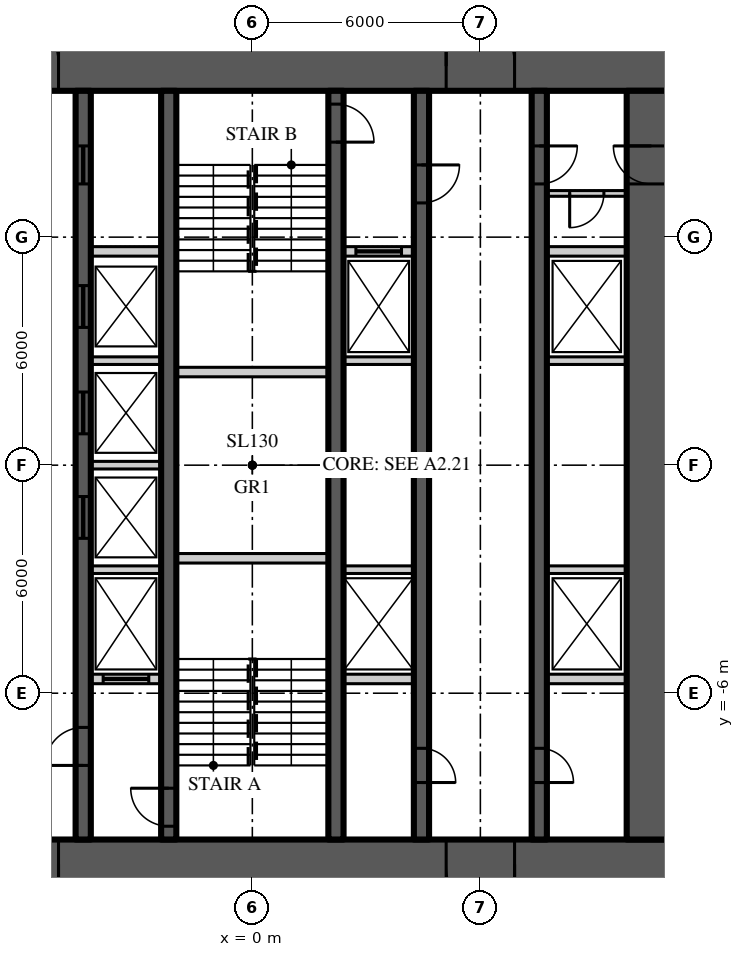
"""IFC4 building model, lengths in metres.
Left out: names, types, materials, properties, quantities, classifications, styles, units other than length and angle.
Written with IfcOpenShell. Run it as: python <this file> out.ifc"""

import sys

from ifc_helpers import new_model, si_unit, direction, frame, frame_2d, origin, place, context, subcontext, project, spatial, rectangle, extrude, element, fill, save


model = new_model("IFC4")
c1 = context("Model", 3, precision=1e-05, world=origin(), true_north=direction((0.0, 1.0)))
c2 = subcontext(c1, "Body", "Model", "MODEL_VIEW")
j1 = project(units=[si_unit("LENGTHUNIT", "METRE"), si_unit("PLANEANGLEUNIT", "RADIAN")], contexts=[c1])
p1 = place(None, origin())
s1 = spatial("IfcSite", under=j1, at=p1, CompositionType="ELEMENT")
p2 = place(p1, origin())
s2 = spatial("IfcBuilding", under=s1, at=p2, CompositionType="ELEMENT")
p3 = place(p2, frame((0.0, 0.0, 155.4)))
s3 = spatial("IfcBuildingStorey", under=s2, at=p3, CompositionType="ELEMENT", Elevation=155.4)
p4 = place(p3, frame((-11.15, 10.5, 0.0), z_axis=(0.0, 0.0, 1.0), x_axis=(1.0, 0.0, 0.0)))
e1 = element("IfcWall", 1, at=p4, inside=s3, PredefinedType="SHEAR", context=c2, shape_type="SweptSolid", body=[
    extrude(rectangle(XDim=22.3, YDim=1.3, at=frame_2d((11.15, 0.0))), origin(), (0.0, 0.0, 1.0), 3.9),
])
p5 = place(p4, frame((4.25, 0.0, 0.0)))
e2 = element("IfcOpeningElement", 2, at=p5, cuts=e1, PredefinedType="OPENING", context=c2, shape_type="SweptSolid", body=[
    extrude(rectangle(XDim=1.8, YDim=2.2, at=frame_2d((0.9, 1.1))), frame((0.0, 0.66, 0.0), z_axis=(0.0, -1.0, 0.0), x_axis=(1.0, 0.0, 0.0)), (0.0, 0.0, 1.0), 1.32),
])
p6 = place(p4, frame((16.25, 0.0, 0.0)))
e3 = element("IfcOpeningElement", 3, at=p6, cuts=e1, PredefinedType="OPENING", context=c2, shape_type="SweptSolid", body=[
    extrude(rectangle(XDim=1.8, YDim=2.2, at=frame_2d((0.9, 1.1))), frame((0.0, 0.66, 0.0), z_axis=(0.0, -1.0, 0.0), x_axis=(1.0, 0.0, 0.0)), (0.0, 0.0, 1.0), 1.32),
])
p7 = place(p3, frame((11.15, -10.5, 0.0), z_axis=(0.0, 0.0, 1.0), x_axis=(-1.0, 0.0, 0.0)))
e4 = element("IfcWall", 4, at=p7, inside=s3, PredefinedType="SHEAR", context=c2, shape_type="SweptSolid", body=[
    extrude(rectangle(XDim=22.3, YDim=1.3, at=frame_2d((11.15, 0.0))), origin(), (0.0, 0.0, 1.0), 3.9),
])
p8 = place(p7, frame((16.25, 0.0, 0.0)))
e5 = element("IfcOpeningElement", 5, at=p8, cuts=e4, PredefinedType="OPENING", context=c2, shape_type="SweptSolid", body=[
    extrude(rectangle(XDim=1.8, YDim=2.2, at=frame_2d((0.9, 1.1))), frame((0.0, 0.66, 0.0), z_axis=(0.0, -1.0, 0.0), x_axis=(1.0, 0.0, 0.0)), (0.0, 0.0, 1.0), 1.32),
])
p9 = place(p7, frame((4.25, 0.0, 0.0)))
e6 = element("IfcOpeningElement", 6, at=p9, cuts=e4, PredefinedType="OPENING", context=c2, shape_type="SweptSolid", body=[
    extrude(rectangle(XDim=1.8, YDim=2.2, at=frame_2d((0.9, 1.1))), frame((0.0, 0.66, 0.0), z_axis=(0.0, -1.0, 0.0), x_axis=(1.0, 0.0, 0.0)), (0.0, 0.0, 1.0), 1.32),
])
p10 = place(p3, frame((10.5, -9.85, 0.0), z_axis=(0.0, 0.0, 1.0), x_axis=(0.0, 1.0, 0.0)))
e7 = element("IfcWall", 7, at=p10, inside=s3, PredefinedType="SHEAR", context=c2, shape_type="SweptSolid", body=[
    extrude(rectangle(XDim=19.7, YDim=1.3, at=frame_2d((9.85, 0.0))), origin(), (0.0, 0.0, 1.0), 3.9),
])
p11 = place(p10, frame((17.25, 0.0, 0.0)))
e8 = element("IfcOpeningElement", 8, at=p11, cuts=e7, PredefinedType="OPENING", context=c2, shape_type="SweptSolid", body=[
    extrude(rectangle(XDim=1.0, YDim=2.2, at=frame_2d((0.5, 1.1))), frame((0.0, 0.66, 0.0), z_axis=(0.0, -1.0, 0.0), x_axis=(1.0, 0.0, 0.0)), (0.0, 0.0, 1.0), 1.32),
])
p12 = place(p3, frame((7.55, 9.85, 0.0), z_axis=(0.0, 0.0, 1.0), x_axis=(0.0, -1.0, 0.0)))
e9 = element("IfcWall", 9, at=p12, inside=s3, PredefinedType="SHEAR", context=c2, shape_type="SweptSolid", body=[
    extrude(rectangle(XDim=19.7, YDim=0.4, at=frame_2d((9.85, 0.0))), origin(), (0.0, 0.0, 1.0), 3.9),
])
p13 = place(p12, frame((1.45, 0.0, 0.0)))
e10 = element("IfcOpeningElement", 10, at=p13, cuts=e9, PredefinedType="OPENING", context=c2, shape_type="SweptSolid", body=[
    extrude(rectangle(XDim=1.0, YDim=2.2, at=frame_2d((0.5, 1.1))), frame((0.0, 0.21, 0.0), z_axis=(0.0, -1.0, 0.0), x_axis=(1.0, 0.0, 0.0)), (0.0, 0.0, 1.0), 0.42),
])
p14 = place(p12, frame((17.3, 0.0, 0.0)))
e11 = element("IfcOpeningElement", 11, at=p14, cuts=e9, PredefinedType="OPENING", context=c2, shape_type="SweptSolid", body=[
    extrude(rectangle(XDim=0.9, YDim=2.1, at=frame_2d((0.45, 1.05))), frame((0.0, 0.21, 0.0), z_axis=(0.0, -1.0, 0.0), x_axis=(1.0, 0.0, 0.0)), (0.0, 0.0, 1.0), 0.42),
])
p15 = place(p3, frame((-4.45, -9.85, 0.0), z_axis=(0.0, 0.0, 1.0), x_axis=(0.0, 1.0, 0.0)))
e12 = element("IfcWall", 12, at=p15, inside=s3, PredefinedType="SHEAR", context=c2, shape_type="SweptSolid", body=[
    extrude(rectangle(XDim=19.7, YDim=0.4, at=frame_2d((9.85, 0.0))), origin(), (0.0, 0.0, 1.0), 3.9),
])
p16 = place(p15, frame((1.95, 0.0, 0.0)))
e13 = element("IfcOpeningElement", 13, at=p16, cuts=e12, PredefinedType="OPENING", context=c2, shape_type="SweptSolid", body=[
    extrude(rectangle(XDim=1.0, YDim=2.2, at=frame_2d((0.5, 1.1))), frame((0.0, 0.21, 0.0), z_axis=(0.0, -1.0, 0.0), x_axis=(1.0, 0.0, 0.0)), (0.0, 0.0, 1.0), 0.42),
])
p17 = place(p15, frame((17.25, 0.0, 0.0)))
e14 = element("IfcOpeningElement", 14, at=p17, cuts=e12, PredefinedType="OPENING", context=c2, shape_type="SweptSolid", body=[
    extrude(rectangle(XDim=1.0, YDim=2.1, at=frame_2d((0.5, 1.05))), frame((0.0, 0.21, 0.0), z_axis=(0.0, -1.0, 0.0), x_axis=(1.0, 0.0, 0.0)), (0.0, 0.0, 1.0), 0.42),
])
p18 = place(p15, frame((7.925, 0.0, 0.0)))
e15 = element("IfcOpeningElement", 15, at=p18, cuts=e12, PredefinedType="OPENING", context=c2, shape_type="SweptSolid", body=[
    extrude(rectangle(XDim=1.1, YDim=2.2, at=frame_2d((0.55, 1.1))), frame((0.0, 0.21, 0.0), z_axis=(0.0, -1.0, 0.0), x_axis=(1.0, 0.0, 0.0)), (0.0, 0.0, 1.0), 0.42),
])
p19 = place(p15, frame((10.675, 0.0, 0.0)))
e16 = element("IfcOpeningElement", 16, at=p19, cuts=e12, PredefinedType="OPENING", context=c2, shape_type="SweptSolid", body=[
    extrude(rectangle(XDim=1.1, YDim=2.2, at=frame_2d((0.55, 1.1))), frame((0.0, 0.21, 0.0), z_axis=(0.0, -1.0, 0.0), x_axis=(1.0, 0.0, 0.0)), (0.0, 0.0, 1.0), 0.42),
])
p20 = place(p15, frame((13.475, 0.0, 0.0)))
e17 = element("IfcOpeningElement", 17, at=p20, cuts=e12, PredefinedType="OPENING", context=c2, shape_type="SweptSolid", body=[
    extrude(rectangle(XDim=1.1, YDim=2.2, at=frame_2d((0.55, 1.1))), frame((0.0, 0.21, 0.0), z_axis=(0.0, -1.0, 0.0), x_axis=(1.0, 0.0, 0.0)), (0.0, 0.0, 1.0), 0.42),
])
p21 = place(p3, frame((4.45, 9.85, 0.0), z_axis=(0.0, 0.0, 1.0), x_axis=(0.0, -1.0, 0.0)))
e18 = element("IfcWall", 18, at=p21, inside=s3, PredefinedType="SHEAR", context=c2, shape_type="SweptSolid", body=[
    extrude(rectangle(XDim=19.7, YDim=0.4, at=frame_2d((9.85, 0.0))), origin(), (0.0, 0.0, 1.0), 3.9),
])
p22 = place(p21, frame((1.95, 0.0, 0.0)))
e19 = element("IfcOpeningElement", 19, at=p22, cuts=e18, PredefinedType="OPENING", context=c2, shape_type="SweptSolid", body=[
    extrude(rectangle(XDim=1.0, YDim=2.2, at=frame_2d((0.5, 1.1))), frame((0.0, 0.21, 0.0), z_axis=(0.0, -1.0, 0.0), x_axis=(1.0, 0.0, 0.0)), (0.0, 0.0, 1.0), 0.42),
])
p23 = place(p21, frame((17.3, 0.0, 0.0)))
e20 = element("IfcOpeningElement", 20, at=p23, cuts=e18, PredefinedType="OPENING", context=c2, shape_type="SweptSolid", body=[
    extrude(rectangle(XDim=0.9, YDim=2.1, at=frame_2d((0.45, 1.05))), frame((0.0, 0.21, 0.0), z_axis=(0.0, -1.0, 0.0), x_axis=(1.0, 0.0, 0.0)), (0.0, 0.0, 1.0), 0.42),
])
p24 = place(p3, frame((-2.2, -9.85, 0.0), z_axis=(0.0, 0.0, 1.0), x_axis=(0.0, 1.0, 0.0)))
e21 = element("IfcWall", 21, at=p24, inside=s3, PredefinedType="SHEAR", context=c2, shape_type="SweptSolid", body=[
    extrude(rectangle(XDim=19.7, YDim=0.4, at=frame_2d((9.85, 0.0))), origin(), (0.0, 0.0, 1.0), 3.9),
])
p25 = place(p24, frame((0.35, 0.0, 0.0)))
e22 = element("IfcOpeningElement", 22, at=p25, cuts=e21, PredefinedType="OPENING", context=c2, shape_type="SweptSolid", body=[
    extrude(rectangle(XDim=1.0, YDim=2.2, at=frame_2d((0.5, 1.1))), frame((0.0, 0.21, 0.0), z_axis=(0.0, -1.0, 0.0), x_axis=(1.0, 0.0, 0.0)), (0.0, 0.0, 1.0), 0.42),
])
p26 = place(p3, frame((2.2, 9.85, 0.0), z_axis=(0.0, 0.0, 1.0), x_axis=(0.0, -1.0, 0.0)))
e23 = element("IfcWall", 23, at=p26, inside=s3, PredefinedType="SHEAR", context=c2, shape_type="SweptSolid", body=[
    extrude(rectangle(XDim=19.7, YDim=0.4, at=frame_2d((9.85, 0.0))), origin(), (0.0, 0.0, 1.0), 3.9),
])
p27 = place(p26, frame((0.35, 0.0, 0.0)))
e24 = element("IfcOpeningElement", 24, at=p27, cuts=e23, PredefinedType="OPENING", context=c2, shape_type="SweptSolid", body=[
    extrude(rectangle(XDim=1.0, YDim=2.2, at=frame_2d((0.5, 1.1))), frame((0.0, 0.21, 0.0), z_axis=(0.0, -1.0, 0.0), x_axis=(1.0, 0.0, 0.0)), (0.0, 0.0, 1.0), 0.42),
])
p28 = place(p3, frame((-4.25, 5.625, 0.0), z_axis=(0.0, 0.0, 1.0), x_axis=(1.0, 0.0, 0.0)))
e25 = element("IfcWall", 25, at=p28, inside=s3, PredefinedType="SOLIDWALL", context=c2, shape_type="SweptSolid", body=[
    extrude(rectangle(XDim=1.85, YDim=0.25, at=frame_2d((0.925, 0.0))), origin(), (0.0, 0.0, 1.0), 3.7),
])
p29 = place(p3, frame((2.4, 5.625, 0.0), z_axis=(0.0, 0.0, 1.0), x_axis=(1.0, 0.0, 0.0)))
e26 = element("IfcWall", 26, at=p29, inside=s3, PredefinedType="SOLIDWALL", context=c2, shape_type="SweptSolid", body=[
    extrude(rectangle(XDim=1.85, YDim=0.25, at=frame_2d((0.925, 0.0))), origin(), (0.0, 0.0, 1.0), 3.7),
])
p30 = place(p29, frame((0.325, 0.0, 0.0)))
e27 = element("IfcOpeningElement", 27, at=p30, cuts=e26, PredefinedType="OPENING", context=c2, shape_type="SweptSolid", body=[
    extrude(rectangle(XDim=1.2, YDim=2.2, at=frame_2d((0.6, 1.1))), frame((0.0, 0.135, 0.0), z_axis=(0.0, -1.0, 0.0), x_axis=(1.0, 0.0, 0.0)), (0.0, 0.0, 1.0), 0.27),
])
p31 = place(p3, frame((7.75, 5.625, 0.0), z_axis=(0.0, 0.0, 1.0), x_axis=(1.0, 0.0, 0.0)))
e28 = element("IfcWall", 28, at=p31, inside=s3, PredefinedType="SOLIDWALL", context=c2, shape_type="SweptSolid", body=[
    extrude(rectangle(XDim=2.1, YDim=0.25, at=frame_2d((1.05, 0.0))), origin(), (0.0, 0.0, 1.0), 3.7),
])
p32 = place(p3, frame((-4.25, -5.625, 0.0), z_axis=(0.0, 0.0, 1.0), x_axis=(1.0, 0.0, 0.0)))
e29 = element("IfcWall", 29, at=p32, inside=s3, PredefinedType="SOLIDWALL", context=c2, shape_type="SweptSolid", body=[
    extrude(rectangle(XDim=1.85, YDim=0.25, at=frame_2d((0.925, 0.0))), origin(), (0.0, 0.0, 1.0), 3.7),
])
p33 = place(p32, frame((0.325, 0.0, 0.0)))
e30 = element("IfcOpeningElement", 30, at=p33, cuts=e29, PredefinedType="OPENING", context=c2, shape_type="SweptSolid", body=[
    extrude(rectangle(XDim=1.2, YDim=2.2, at=frame_2d((0.6, 1.1))), frame((0.0, 0.135, 0.0), z_axis=(0.0, -1.0, 0.0), x_axis=(1.0, 0.0, 0.0)), (0.0, 0.0, 1.0), 0.27),
])
p34 = place(p3, frame((2.4, -5.625, 0.0), z_axis=(0.0, 0.0, 1.0), x_axis=(1.0, 0.0, 0.0)))
e31 = element("IfcWall", 31, at=p34, inside=s3, PredefinedType="SOLIDWALL", context=c2, shape_type="SweptSolid", body=[
    extrude(rectangle(XDim=1.85, YDim=0.25, at=frame_2d((0.925, 0.0))), origin(), (0.0, 0.0, 1.0), 3.7),
])
p35 = place(p3, frame((7.75, -5.625, 0.0), z_axis=(0.0, 0.0, 1.0), x_axis=(1.0, 0.0, 0.0)))
e32 = element("IfcWall", 32, at=p35, inside=s3, PredefinedType="SOLIDWALL", context=c2, shape_type="SweptSolid", body=[
    extrude(rectangle(XDim=2.1, YDim=0.25, at=frame_2d((1.05, 0.0))), origin(), (0.0, 0.0, 1.0), 3.7),
])
for number, where, z_axis, x_axis in (
    (33, (-2.0, -2.45, 0.0), (0.0, 0.0, 1.0), (1.0, 0.0, 0.0)),
    (34, (-2.0, 2.45, 0.0), (0.0, 0.0, 1.0), (1.0, 0.0, 0.0)),
):
    element("IfcWall", number, at=place(p3, frame(where, z_axis=z_axis, x_axis=x_axis)), inside=s3, PredefinedType="SOLIDWALL", context=c2, shape_type="SweptSolid", body=[
        extrude(rectangle(XDim=4.0, YDim=0.25, at=frame_2d((2.0, 0.0))), origin(), (0.0, 0.0, 1.0), 3.7),
    ])
for number, where, z_axis, x_axis in (
    (35, (-4.25, -2.75, 0.0), (0.0, 0.0, 1.0), (1.0, 0.0, 0.0)),
    (36, (2.4, -2.75, 0.0), (0.0, 0.0, 1.0), (1.0, 0.0, 0.0)),
):
    element("IfcWall", number, at=place(p3, frame(where, z_axis=z_axis, x_axis=x_axis)), inside=s3, PredefinedType="SOLIDWALL", context=c2, shape_type="SweptSolid", body=[
        extrude(rectangle(XDim=1.85, YDim=0.2, at=frame_2d((0.925, 0.0))), origin(), (0.0, 0.0, 1.0), 3.7),
    ])
p36 = place(p3, frame((7.75, -2.75, 0.0), z_axis=(0.0, 0.0, 1.0), x_axis=(1.0, 0.0, 0.0)))
e37 = element("IfcWall", 37, at=p36, inside=s3, PredefinedType="SOLIDWALL", context=c2, shape_type="SweptSolid", body=[
    extrude(rectangle(XDim=2.1, YDim=0.2, at=frame_2d((1.05, 0.0))), origin(), (0.0, 0.0, 1.0), 3.7),
])
for number, where, z_axis, x_axis in (
    (38, (-4.25, 0.0, 0.0), (0.0, 0.0, 1.0), (1.0, 0.0, 0.0)),
    (39, (-4.25, 2.75, 0.0), (0.0, 0.0, 1.0), (1.0, 0.0, 0.0)),
    (40, (2.4, 2.75, 0.0), (0.0, 0.0, 1.0), (1.0, 0.0, 0.0)),
):
    element("IfcWall", number, at=place(p3, frame(where, z_axis=z_axis, x_axis=x_axis)), inside=s3, PredefinedType="SOLIDWALL", context=c2, shape_type="SweptSolid", body=[
        extrude(rectangle(XDim=1.85, YDim=0.2, at=frame_2d((0.925, 0.0))), origin(), (0.0, 0.0, 1.0), 3.7),
    ])
p37 = place(p3, frame((7.75, 2.75, 0.0), z_axis=(0.0, 0.0, 1.0), x_axis=(1.0, 0.0, 0.0)))
e41 = element("IfcWall", 41, at=p37, inside=s3, PredefinedType="SOLIDWALL", context=c2, shape_type="SweptSolid", body=[
    extrude(rectangle(XDim=2.1, YDim=0.2, at=frame_2d((1.05, 0.0))), origin(), (0.0, 0.0, 1.0), 3.7),
])
p38 = place(p3, frame((9.85, 7.15, 0.0), z_axis=(0.0, 0.0, 1.0), x_axis=(-1.0, 0.0, 0.0)))
e42 = element("IfcWall", 42, at=p38, inside=s3, PredefinedType="SOLIDWALL", context=c2, shape_type="SweptSolid", body=[
    extrude(rectangle(XDim=2.1, YDim=0.15, at=frame_2d((1.05, 0.0))), origin(), (0.0, 0.0, 1.0), 3.77),
])
p39 = place(p38, frame((0.6, 0.0, 0.0)))
e43 = element("IfcOpeningElement", 43, at=p39, cuts=e42, PredefinedType="OPENING", context=c2, shape_type="SweptSolid", body=[
    extrude(rectangle(XDim=0.9, YDim=2.1, at=frame_2d((0.45, 1.05))), frame((0.0, 0.085, 0.0), z_axis=(0.0, -1.0, 0.0), x_axis=(1.0, 0.0, 0.0)), (0.0, 0.0, 1.0), 0.17),
])
p40 = place(p5, origin())
e44 = element("IfcDoor", 44, at=p40, inside=s3, OperationType="DOUBLE_DOOR_DOUBLE_SWING", PredefinedType="DOOR", context=c2, shape_type="SweptSolid", body=[
    extrude(rectangle(XDim=1.8, YDim=2.2, at=frame_2d((0.9, 1.1))), frame((0.0, 0.025, 0.0), z_axis=(0.0, -1.0, 0.0), x_axis=(1.0, 0.0, 0.0)), (0.0, 0.0, 1.0), 0.05),
])
fill(e2, e44)
p41 = place(p8, origin())
e45 = element("IfcDoor", 45, at=p41, inside=s3, OperationType="DOUBLE_DOOR_DOUBLE_SWING", PredefinedType="DOOR", context=c2, shape_type="SweptSolid", body=[
    extrude(rectangle(XDim=1.8, YDim=2.2, at=frame_2d((0.9, 1.1))), frame((0.0, 0.025, 0.0), z_axis=(0.0, -1.0, 0.0), x_axis=(1.0, 0.0, 0.0)), (0.0, 0.0, 1.0), 0.05),
])
fill(e5, e45)
p42 = place(p6, origin())
e46 = element("IfcDoor", 46, at=p42, inside=s3, OperationType="DOUBLE_DOOR_DOUBLE_SWING", PredefinedType="DOOR", context=c2, shape_type="SweptSolid", body=[
    extrude(rectangle(XDim=1.8, YDim=2.2, at=frame_2d((0.9, 1.1))), frame((0.0, 0.025, 0.0), z_axis=(0.0, -1.0, 0.0), x_axis=(1.0, 0.0, 0.0)), (0.0, 0.0, 1.0), 0.05),
])
fill(e3, e46)
p43 = place(p9, origin())
e47 = element("IfcDoor", 47, at=p43, inside=s3, OperationType="DOUBLE_DOOR_DOUBLE_SWING", PredefinedType="DOOR", context=c2, shape_type="SweptSolid", body=[
    extrude(rectangle(XDim=1.8, YDim=2.2, at=frame_2d((0.9, 1.1))), frame((0.0, 0.025, 0.0), z_axis=(0.0, -1.0, 0.0), x_axis=(1.0, 0.0, 0.0)), (0.0, 0.0, 1.0), 0.05),
])
fill(e6, e47)
p44 = place(p13, origin())
e48 = element("IfcDoor", 48, at=p44, inside=s3, OperationType="SINGLE_SWING_LEFT", PredefinedType="DOOR", context=c2, shape_type="SweptSolid", body=[
    extrude(rectangle(XDim=1.0, YDim=2.2, at=frame_2d((0.5, 1.1))), frame((0.0, 0.025, 0.0), z_axis=(0.0, -1.0, 0.0), x_axis=(1.0, 0.0, 0.0)), (0.0, 0.0, 1.0), 0.05),
])
fill(e10, e48)
p45 = place(p11, origin())
e49 = element("IfcDoor", 49, at=p45, inside=s3, OperationType="SINGLE_SWING_RIGHT", PredefinedType="DOOR", context=c2, shape_type="SweptSolid", body=[
    extrude(rectangle(XDim=1.0, YDim=2.2, at=frame_2d((0.5, 1.1))), frame((0.0, 0.025, 0.0), z_axis=(0.0, -1.0, 0.0), x_axis=(1.0, 0.0, 0.0)), (0.0, 0.0, 1.0), 0.05),
])
fill(e8, e49)
p46 = place(p16, origin())
e50 = element("IfcDoor", 50, at=p46, inside=s3, OperationType="SINGLE_SWING_LEFT", PredefinedType="DOOR", context=c2, shape_type="SweptSolid", body=[
    extrude(rectangle(XDim=1.0, YDim=2.2, at=frame_2d((0.5, 1.1))), frame((0.0, 0.025, 0.0), z_axis=(0.0, -1.0, 0.0), x_axis=(1.0, 0.0, 0.0)), (0.0, 0.0, 1.0), 0.05),
])
fill(e13, e50)
p47 = place(p25, origin())
e51 = element("IfcDoor", 51, at=p47, inside=s3, OperationType="SINGLE_SWING_RIGHT", PredefinedType="DOOR", context=c2, shape_type="SweptSolid", body=[
    extrude(rectangle(XDim=1.0, YDim=2.2, at=frame_2d((0.5, 1.1))), frame((0.0, 0.025, 0.0), z_axis=(0.0, -1.0, 0.0), x_axis=(1.0, 0.0, 0.0)), (0.0, 0.0, 1.0), 0.05),
])
fill(e22, e51)
p48 = place(p22, origin())
e52 = element("IfcDoor", 52, at=p48, inside=s3, OperationType="SINGLE_SWING_LEFT", PredefinedType="DOOR", context=c2, shape_type="SweptSolid", body=[
    extrude(rectangle(XDim=1.0, YDim=2.2, at=frame_2d((0.5, 1.1))), frame((0.0, 0.025, 0.0), z_axis=(0.0, -1.0, 0.0), x_axis=(1.0, 0.0, 0.0)), (0.0, 0.0, 1.0), 0.05),
])
fill(e19, e52)
p49 = place(p27, origin())
e53 = element("IfcDoor", 53, at=p49, inside=s3, OperationType="SINGLE_SWING_RIGHT", PredefinedType="DOOR", context=c2, shape_type="SweptSolid", body=[
    extrude(rectangle(XDim=1.0, YDim=2.2, at=frame_2d((0.5, 1.1))), frame((0.0, 0.025, 0.0), z_axis=(0.0, -1.0, 0.0), x_axis=(1.0, 0.0, 0.0)), (0.0, 0.0, 1.0), 0.05),
])
fill(e24, e53)
p50 = place(p17, origin())
e54 = element("IfcDoor", 54, at=p50, inside=s3, OperationType="SLIDING_TO_LEFT", PredefinedType="DOOR", context=c2, shape_type="SweptSolid", body=[
    extrude(rectangle(XDim=1.0, YDim=2.1, at=frame_2d((0.5, 1.05))), frame((0.0, 0.025, 0.0), z_axis=(0.0, -1.0, 0.0), x_axis=(1.0, 0.0, 0.0)), (0.0, 0.0, 1.0), 0.05),
])
fill(e14, e54)
p51 = place(p14, origin())
e55 = element("IfcDoor", 55, at=p51, inside=s3, OperationType="SINGLE_SWING_RIGHT", PredefinedType="DOOR", context=c2, shape_type="SweptSolid", body=[
    extrude(rectangle(XDim=0.9, YDim=2.1, at=frame_2d((0.45, 1.05))), frame((0.0, 0.025, 0.0), z_axis=(0.0, -1.0, 0.0), x_axis=(1.0, 0.0, 0.0)), (0.0, 0.0, 1.0), 0.05),
])
fill(e11, e55)
p52 = place(p23, origin())
e56 = element("IfcDoor", 56, at=p52, inside=s3, OperationType="SINGLE_SWING_RIGHT", PredefinedType="DOOR", context=c2, shape_type="SweptSolid", body=[
    extrude(rectangle(XDim=0.9, YDim=2.1, at=frame_2d((0.45, 1.05))), frame((0.0, 0.025, 0.0), z_axis=(0.0, -1.0, 0.0), x_axis=(1.0, 0.0, 0.0)), (0.0, 0.0, 1.0), 0.05),
])
fill(e20, e56)
p53 = place(p18, origin())
e57 = element("IfcDoor", 57, at=p53, inside=s3, OperationType="SLIDING_TO_LEFT", PredefinedType="DOOR", context=c2, shape_type="SweptSolid", body=[
    extrude(rectangle(XDim=1.1, YDim=2.2, at=frame_2d((0.55, 1.1))), frame((0.0, 0.025, 0.0), z_axis=(0.0, -1.0, 0.0), x_axis=(1.0, 0.0, 0.0)), (0.0, 0.0, 1.0), 0.05),
])
fill(e15, e57)
p54 = place(p19, origin())
e58 = element("IfcDoor", 58, at=p54, inside=s3, OperationType="SLIDING_TO_LEFT", PredefinedType="DOOR", context=c2, shape_type="SweptSolid", body=[
    extrude(rectangle(XDim=1.1, YDim=2.2, at=frame_2d((0.55, 1.1))), frame((0.0, 0.025, 0.0), z_axis=(0.0, -1.0, 0.0), x_axis=(1.0, 0.0, 0.0)), (0.0, 0.0, 1.0), 0.05),
])
fill(e16, e58)
p55 = place(p20, origin())
e59 = element("IfcDoor", 59, at=p55, inside=s3, OperationType="SLIDING_TO_LEFT", PredefinedType="DOOR", context=c2, shape_type="SweptSolid", body=[
    extrude(rectangle(XDim=1.1, YDim=2.2, at=frame_2d((0.55, 1.1))), frame((0.0, 0.025, 0.0), z_axis=(0.0, -1.0, 0.0), x_axis=(1.0, 0.0, 0.0)), (0.0, 0.0, 1.0), 0.05),
])
fill(e17, e59)
p56 = place(p33, origin())
e60 = element("IfcDoor", 60, at=p56, inside=s3, OperationType="SLIDING_TO_LEFT", PredefinedType="DOOR", context=c2, shape_type="SweptSolid", body=[
    extrude(rectangle(XDim=1.2, YDim=2.2, at=frame_2d((0.6, 1.1))), frame((0.0, 0.025, 0.0), z_axis=(0.0, -1.0, 0.0), x_axis=(1.0, 0.0, 0.0)), (0.0, 0.0, 1.0), 0.05),
])
fill(e30, e60)
p57 = place(p30, origin())
e61 = element("IfcDoor", 61, at=p57, inside=s3, OperationType="SLIDING_TO_LEFT", PredefinedType="DOOR", context=c2, shape_type="SweptSolid", body=[
    extrude(rectangle(XDim=1.2, YDim=2.2, at=frame_2d((0.6, 1.1))), frame((0.0, 0.025, 0.0), z_axis=(0.0, -1.0, 0.0), x_axis=(1.0, 0.0, 0.0)), (0.0, 0.0, 1.0), 0.05),
])
fill(e27, e61)
p58 = place(p39, origin())
e62 = element("IfcDoor", 62, at=p58, inside=s3, OperationType="SINGLE_SWING_RIGHT", PredefinedType="DOOR", context=c2, shape_type="SweptSolid", body=[
    extrude(rectangle(XDim=0.9, YDim=2.1, at=frame_2d((0.45, 1.05))), frame((0.0, 0.025, 0.0), z_axis=(0.0, -1.0, 0.0), x_axis=(1.0, 0.0, 0.0)), (0.0, 0.0, 1.0), 0.05),
])
fill(e43, e62)
save(model, sys.argv[1])
